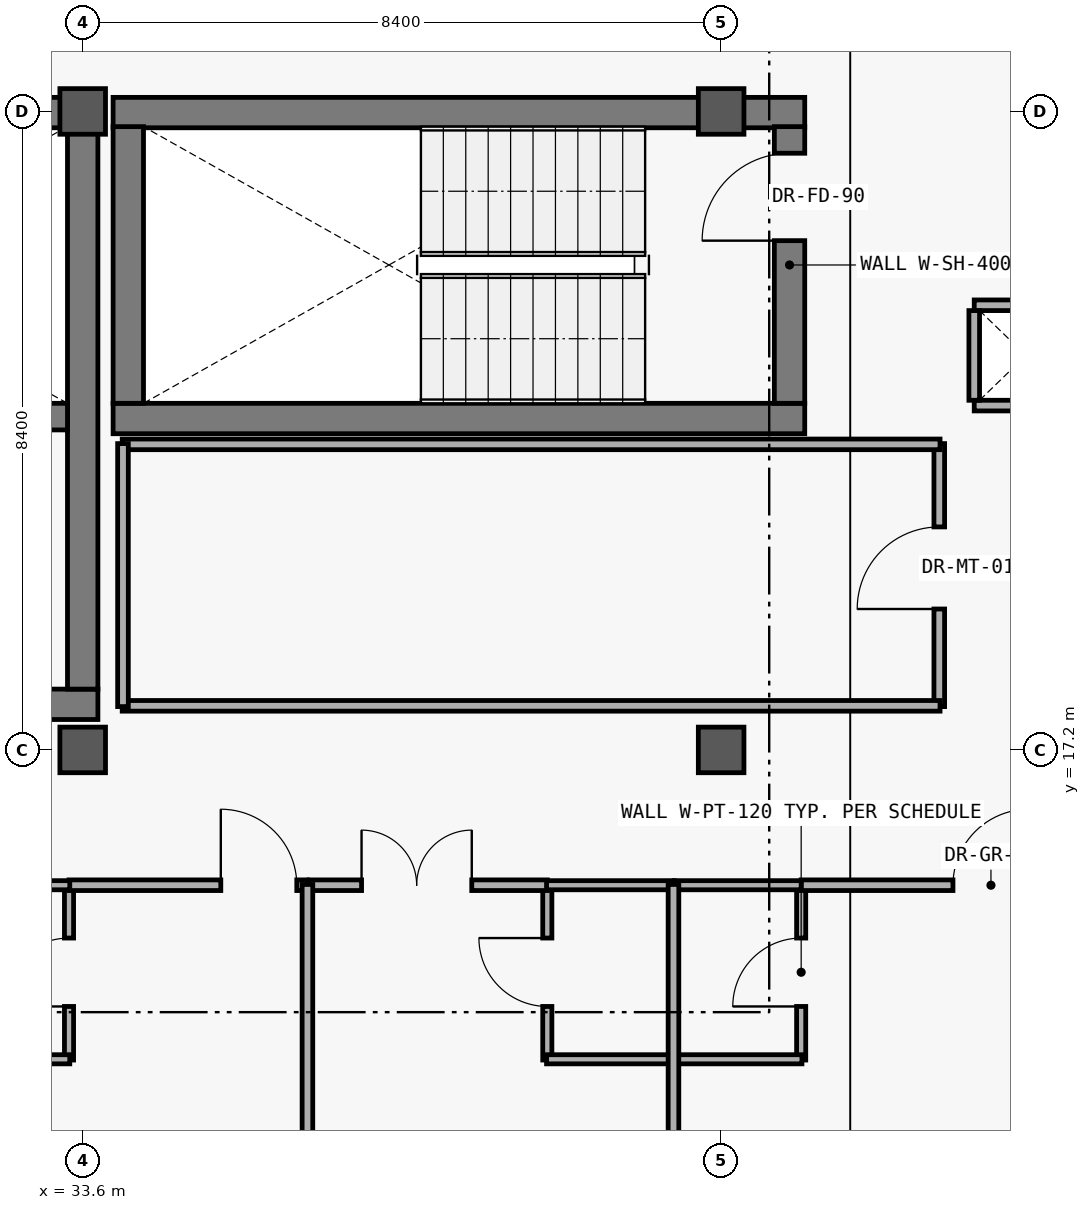
"""IFC4 building model, lengths in metres.
Left out: names, types, materials, properties, quantities, classifications, styles, units other than length and angle.
Written with IfcOpenShell. Run it as: python <this file> out.ifc"""

import sys

from ifc_helpers import new_model, si_unit, direction, frame, frame_2d, origin, origin_2d, place, context, subcontext, project, spatial, rectangle, extrude, element, fill, save


model = new_model("IFC4")
c1 = context("Model", 3, precision=1e-05, world=origin(), true_north=direction((0.0, 1.0)))
c2 = subcontext(c1, "Body", "Model", "MODEL_VIEW")
j1 = project(units=[si_unit("LENGTHUNIT", "METRE"), si_unit("PLANEANGLEUNIT", "RADIAN")], contexts=[c1])
p1 = place(None, origin())
s1 = spatial("IfcSite", under=j1, at=p1, CompositionType="ELEMENT")
p2 = place(p1, origin())
s2 = spatial("IfcBuilding", under=s1, at=p2, CompositionType="ELEMENT")
p3 = place(p2, frame((0.0, 0.0, 37.2)))
s3 = spatial("IfcBuildingStorey", under=s2, at=p3, CompositionType="ELEMENT", Elevation=37.2)
for number, where, z_axis, x_axis in (
    (1, (33.6, 17.2, 0.0), (0.0, 0.0, 1.0), (1.0, 0.0, 0.0)),
    (2, (33.6, 25.6, 0.0), (0.0, 0.0, 1.0), (1.0, 0.0, 0.0)),
    (3, (42.0, 17.2, 0.0), (0.0, 0.0, 1.0), (1.0, 0.0, 0.0)),
    (4, (42.0, 25.6, 0.0), (0.0, 0.0, 1.0), (1.0, 0.0, 0.0)),
):
    element("IfcColumn", number, at=place(p3, frame(where, z_axis=z_axis, x_axis=x_axis)), inside=s3, PredefinedType="COLUMN", context=c2, shape_type="SweptSolid", body=[
        extrude(rectangle(XDim=0.6, YDim=0.6, at=origin_2d()), origin(), (0.0, 0.0, 1.0), 3.6),
    ])
p4 = place(p3, frame((24.6, 17.8, 0.0), z_axis=(0.0, 0.0, 1.0), x_axis=(1.0, 0.0, 0.0)))
e5 = element("IfcWall", 5, at=p4, inside=s3, PredefinedType="SHEAR", context=c2, shape_type="SweptSolid", body=[
    extrude(rectangle(XDim=9.2, YDim=0.4, at=frame_2d((4.6, 0.0))), origin(), (0.0, 0.0, 1.0), 3.32),
])
p5 = place(p4, frame((1.1, 0.0, 0.0)))
e6 = element("IfcOpeningElement", 6, at=p5, cuts=e5, PredefinedType="OPENING", context=c2, shape_type="SweptSolid", body=[
    extrude(rectangle(XDim=1.2, YDim=2.2, at=frame_2d((0.6, 1.1))), frame((0.0, 0.21, 0.0), z_axis=(0.0, -1.0, 0.0), x_axis=(1.0, 0.0, 0.0)), (0.0, 0.0, 1.0), 0.42),
])
p6 = place(p4, frame((3.5, 0.0, 0.0)))
e7 = element("IfcOpeningElement", 7, at=p6, cuts=e5, PredefinedType="OPENING", context=c2, shape_type="SweptSolid", body=[
    extrude(rectangle(XDim=1.1, YDim=2.2, at=frame_2d((0.55, 1.1))), frame((0.0, 0.21, 0.0), z_axis=(0.0, -1.0, 0.0), x_axis=(1.0, 0.0, 0.0)), (0.0, 0.0, 1.0), 0.42),
])
p7 = place(p4, frame((5.9, 0.0, 0.0)))
e8 = element("IfcOpeningElement", 8, at=p7, cuts=e5, PredefinedType="OPENING", context=c2, shape_type="SweptSolid", body=[
    extrude(rectangle(XDim=1.1, YDim=2.2, at=frame_2d((0.55, 1.1))), frame((0.0, 0.21, 0.0), z_axis=(0.0, -1.0, 0.0), x_axis=(1.0, 0.0, 0.0)), (0.0, 0.0, 1.0), 0.42),
])
p8 = place(p3, frame((33.8, 25.585, 0.0), z_axis=(0.0, 0.0, 1.0), x_axis=(-1.0, 0.0, 0.0)))
e9 = element("IfcWall", 9, at=p8, inside=s3, PredefinedType="SHEAR", context=c2, shape_type="SweptSolid", body=[
    extrude(rectangle(XDim=9.2, YDim=0.4, at=frame_2d((4.6, 0.0))), origin(), (0.0, 0.0, 1.0), 3.32),
])
p9 = place(p3, frame((33.6, 18.0, 0.0), z_axis=(0.0, 0.0, 1.0), x_axis=(0.0, 1.0, 0.0)))
e10 = element("IfcWall", 10, at=p9, inside=s3, PredefinedType="SHEAR", context=c2, shape_type="SweptSolid", body=[
    extrude(rectangle(XDim=7.4, YDim=0.4, at=frame_2d((3.7, 0.0))), origin(), (0.0, 0.0, 1.0), 3.32),
])
p10 = place(p3, frame((25.0, 21.585, 0.0), z_axis=(0.0, 0.0, 1.0), x_axis=(1.0, 0.0, 0.0)))
e11 = element("IfcWall", 11, at=p10, inside=s3, PredefinedType="SHEAR", context=c2, shape_type="SweptSolid", body=[
    extrude(rectangle(XDim=8.4, YDim=0.35, at=frame_2d((4.2, 0.0))), origin(), (0.0, 0.0, 1.0), 3.32),
])
for number, where, z_axis, x_axis in (
    (12, (34.0, 21.56, 0.0), (0.0, 0.0, 1.0), (1.0, 0.0, 0.0)),
    (13, (43.1, 25.585, 0.0), (0.0, 0.0, 1.0), (-1.0, 0.0, 0.0)),
):
    element("IfcWall", number, at=place(p3, frame(where, z_axis=z_axis, x_axis=x_axis)), inside=s3, PredefinedType="SHEAR", context=c2, shape_type="SweptSolid", body=[
        extrude(rectangle(XDim=9.1, YDim=0.4, at=frame_2d((4.55, 0.0))), origin(), (0.0, 0.0, 1.0), 3.32),
    ])
p11 = place(p3, frame((34.2, 25.4, 0.0), z_axis=(0.0, 0.0, 1.0), x_axis=(0.0, -1.0, 0.0)))
e14 = element("IfcWall", 14, at=p11, inside=s3, PredefinedType="SHEAR", context=c2, shape_type="SweptSolid", body=[
    extrude(rectangle(XDim=3.64, YDim=0.4, at=frame_2d((1.82, 0.0))), origin(), (0.0, 0.0, 1.0), 3.32),
])
p12 = place(p3, frame((42.9, 21.76, 0.0), z_axis=(0.0, 0.0, 1.0), x_axis=(0.0, 1.0, 0.0)))
e15 = element("IfcWall", 15, at=p12, inside=s3, PredefinedType="SHEAR", context=c2, shape_type="SweptSolid", body=[
    extrude(rectangle(XDim=3.64, YDim=0.4, at=frame_2d((1.82, 0.0))), origin(), (0.0, 0.0, 1.0), 3.32),
])
p13 = place(p12, frame((2.14, 0.0, 0.0)))
e16 = element("IfcOpeningElement", 16, at=p13, cuts=e15, PredefinedType="OPENING", context=c2, shape_type="SweptSolid", body=[
    extrude(rectangle(XDim=1.15, YDim=2.2, at=frame_2d((0.575, 1.1))), frame((0.0, 0.21, 0.0), z_axis=(0.0, -1.0, 0.0), x_axis=(1.0, 0.0, 0.0)), (0.0, 0.0, 1.0), 0.42),
])
p14 = place(p3, frame((33.42, 13.12, 0.0), z_axis=(0.0, 0.0, 1.0), x_axis=(0.0, 1.0, 0.0)))
e17 = element("IfcWall", 17, at=p14, inside=s3, PredefinedType="PARTITIONING", context=c2, shape_type="SweptSolid", body=[
    extrude(rectangle(XDim=2.31, YDim=0.12, at=frame_2d((1.155, 0.0))), origin(), (0.0, 0.0, 1.0), 2.48),
])
p15 = place(p14, frame((0.705, 0.0, 0.0)))
e18 = element("IfcOpeningElement", 18, at=p15, cuts=e17, PredefinedType="OPENING", context=c2, shape_type="SweptSolid", body=[
    extrude(rectangle(XDim=0.9, YDim=2.18, at=frame_2d((0.45, 1.09))), frame((0.0, 0.07, 0.0), z_axis=(0.0, -1.0, 0.0), x_axis=(1.0, 0.0, 0.0)), (0.0, 0.0, 1.0), 0.14),
])
p16 = place(p3, frame((39.713, 13.12, 0.0), z_axis=(0.0, 0.0, 1.0), x_axis=(0.0, 1.0, 0.0)))
e19 = element("IfcWall", 19, at=p16, inside=s3, PredefinedType="PARTITIONING", context=c2, shape_type="SweptSolid", body=[
    extrude(rectangle(XDim=2.31, YDim=0.12, at=frame_2d((1.155, 0.0))), origin(), (0.0, 0.0, 1.0), 2.48),
])
p17 = place(p16, frame((0.705, 0.0, 0.0)))
e20 = element("IfcOpeningElement", 20, at=p17, cuts=e19, PredefinedType="OPENING", context=c2, shape_type="SweptSolid", body=[
    extrude(rectangle(XDim=0.9, YDim=2.18, at=frame_2d((0.45, 1.09))), frame((0.0, 0.07, 0.0), z_axis=(0.0, -1.0, 0.0), x_axis=(1.0, 0.0, 0.0)), (0.0, 0.0, 1.0), 0.14),
])
p18 = place(p3, frame((43.053, 13.12, 0.0), z_axis=(0.0, 0.0, 1.0), x_axis=(0.0, 1.0, 0.0)))
e21 = element("IfcWall", 21, at=p18, inside=s3, PredefinedType="PARTITIONING", context=c2, shape_type="SweptSolid", body=[
    extrude(rectangle(XDim=2.31, YDim=0.12, at=frame_2d((1.155, 0.0))), origin(), (0.0, 0.0, 1.0), 2.48),
])
p19 = place(p18, frame((0.705, 0.0, 0.0)))
e22 = element("IfcOpeningElement", 22, at=p19, cuts=e21, PredefinedType="OPENING", context=c2, shape_type="SweptSolid", body=[
    extrude(rectangle(XDim=0.9, YDim=2.18, at=frame_2d((0.45, 1.09))), frame((0.0, 0.07, 0.0), z_axis=(0.0, -1.0, 0.0), x_axis=(1.0, 0.0, 0.0)), (0.0, 0.0, 1.0), 0.14),
])
p20 = place(p3, frame((44.87, 17.77, 0.0), z_axis=(0.0, 0.0, 1.0), x_axis=(0.0, 1.0, 0.0)))
e23 = element("IfcWall", 23, at=p20, inside=s3, PredefinedType="PARTITIONING", context=c2, shape_type="SweptSolid", body=[
    extrude(rectangle(XDim=3.46, YDim=0.14, at=frame_2d((1.73, 0.0))), origin(), (0.0, 0.0, 1.0), 2.48),
])
p21 = place(p20, frame((1.284, 0.0, 0.0)))
e24 = element("IfcOpeningElement", 24, at=p21, cuts=e23, PredefinedType="OPENING", context=c2, shape_type="SweptSolid", body=[
    extrude(rectangle(XDim=1.08, YDim=2.25, at=frame_2d((0.54, 1.125))), frame((0.0, 0.08, 0.0), z_axis=(0.0, -1.0, 0.0), x_axis=(1.0, 0.0, 0.0)), (0.0, 0.0, 1.0), 0.16),
])
p22 = place(p3, frame((33.42, 15.42, 0.0), z_axis=(0.0, 0.0, 1.0), x_axis=(1.0, 0.0, 0.0)))
e25 = element("IfcWall", 25, at=p22, inside=s3, PredefinedType="PARTITIONING", context=c2, shape_type="SweptSolid", body=[
    extrude(rectangle(XDim=3.137, YDim=0.14, at=frame_2d((1.568, 0.0))), origin(), (0.0, 0.0, 1.0), 2.48),
])
p23 = place(p22, frame((1.997, 0.0, 0.0)))
e26 = element("IfcOpeningElement", 26, at=p23, cuts=e25, PredefinedType="OPENING", context=c2, shape_type="SweptSolid", body=[
    extrude(rectangle(XDim=1.0, YDim=2.28, at=frame_2d((0.5, 1.14))), frame((0.0, 0.08, 0.0), z_axis=(0.0, -1.0, 0.0), x_axis=(1.0, 0.0, 0.0)), (0.0, 0.0, 1.0), 0.16),
])
p24 = place(p3, frame((36.577, 15.42, 0.0), z_axis=(0.0, 0.0, 1.0), x_axis=(1.0, 0.0, 0.0)))
e27 = element("IfcWall", 27, at=p24, inside=s3, PredefinedType="PARTITIONING", context=c2, shape_type="SweptSolid", body=[
    extrude(rectangle(XDim=3.136, YDim=0.14, at=frame_2d((1.568, 0.0))), origin(), (0.0, 0.0, 1.0), 2.48),
])
p25 = place(p24, frame((0.692, 0.0, 0.0)))
e28 = element("IfcOpeningElement", 28, at=p25, cuts=e27, PredefinedType="OPENING", context=c2, shape_type="SweptSolid", body=[
    extrude(rectangle(XDim=1.45, YDim=2.3, at=frame_2d((0.725, 1.15))), frame((0.0, 0.08, 0.0), z_axis=(0.0, -1.0, 0.0), x_axis=(1.0, 0.0, 0.0)), (0.0, 0.0, 1.0), 0.16),
])
p26 = place(p3, frame((43.053, 15.42, 0.0), z_axis=(0.0, 0.0, 1.0), x_axis=(1.0, 0.0, 0.0)))
e29 = element("IfcWall", 29, at=p26, inside=s3, PredefinedType="PARTITIONING", context=c2, shape_type="SweptSolid", body=[
    extrude(rectangle(XDim=3.137, YDim=0.14, at=frame_2d((1.568, 0.0))), origin(), (0.0, 0.0, 1.0), 2.48),
])
p27 = place(p26, frame((1.997, 0.0, 0.0)))
e30 = element("IfcOpeningElement", 30, at=p27, cuts=e29, PredefinedType="OPENING", context=c2, shape_type="SweptSolid", body=[
    extrude(rectangle(XDim=1.0, YDim=2.28, at=frame_2d((0.5, 1.14))), frame((0.0, 0.08, 0.0), z_axis=(0.0, -1.0, 0.0), x_axis=(1.0, 0.0, 0.0)), (0.0, 0.0, 1.0), 0.16),
])
for number, where, z_axis, x_axis in (
    (31, (31.75, 13.13, 0.0), (0.0, 0.0, 1.0), (1.0, 0.0, 0.0)),
    (32, (31.75, 15.42, 0.0), (0.0, 0.0, 1.0), (1.0, 0.0, 0.0)),
):
    element("IfcWall", number, at=place(p3, frame(where, z_axis=z_axis, x_axis=x_axis)), inside=s3, PredefinedType="PARTITIONING", context=c2, shape_type="SweptSolid", body=[
        extrude(rectangle(XDim=1.68, YDim=0.12, at=frame_2d((0.84, 0.0))), origin(), (0.0, 0.0, 1.0), 2.48),
    ])
for number, where, z_axis, x_axis in (
    (33, (39.703, 13.13, 0.0), (0.0, 0.0, 1.0), (1.0, 0.0, 0.0)),
    (34, (39.703, 15.42, 0.0), (0.0, 0.0, 1.0), (1.0, 0.0, 0.0)),
):
    element("IfcWall", number, at=place(p3, frame(where, z_axis=z_axis, x_axis=x_axis)), inside=s3, PredefinedType="PARTITIONING", context=c2, shape_type="SweptSolid", body=[
        extrude(rectangle(XDim=1.68, YDim=0.12, at=frame_2d((0.84, 0.0))), origin(), (0.0, 0.0, 1.0), 2.48),
    ])
p28 = place(p3, frame((41.383, 13.13, 0.0), z_axis=(0.0, 0.0, 1.0), x_axis=(1.0, 0.0, 0.0)))
e35 = element("IfcWall", 35, at=p28, inside=s3, PredefinedType="PARTITIONING", context=c2, shape_type="SweptSolid", body=[
    extrude(rectangle(XDim=1.68, YDim=0.12, at=frame_2d((0.84, 0.0))), origin(), (0.0, 0.0, 1.0), 2.48),
])
p29 = place(p3, frame((41.383, 15.42, 0.0), z_axis=(0.0, 0.0, 1.0), x_axis=(1.0, 0.0, 0.0)))
e36 = element("IfcWall", 36, at=p29, inside=s3, PredefinedType="PARTITIONING", context=c2, shape_type="SweptSolid", body=[
    extrude(rectangle(XDim=1.67, YDim=0.12, at=frame_2d((0.835, 0.0))), origin(), (0.0, 0.0, 1.0), 2.48),
])
for number, where, z_axis, x_axis in (
    (37, (34.12, 17.78, 0.0), (0.0, 0.0, 1.0), (1.0, 0.0, 0.0)),
    (38, (34.12, 21.22, 0.0), (0.0, 0.0, 1.0), (1.0, 0.0, 0.0)),
):
    element("IfcWall", number, at=place(p3, frame(where, z_axis=z_axis, x_axis=x_axis)), inside=s3, PredefinedType="PARTITIONING", context=c2, shape_type="SweptSolid", body=[
        extrude(rectangle(XDim=10.76, YDim=0.14, at=frame_2d((5.38, 0.0))), origin(), (0.0, 0.0, 1.0), 2.48),
    ])
p30 = place(p3, frame((34.13, 17.77, 0.0), z_axis=(0.0, 0.0, 1.0), x_axis=(0.0, 1.0, 0.0)))
e39 = element("IfcWall", 39, at=p30, inside=s3, PredefinedType="PARTITIONING", context=c2, shape_type="SweptSolid", body=[
    extrude(rectangle(XDim=3.46, YDim=0.14, at=frame_2d((1.73, 0.0))), origin(), (0.0, 0.0, 1.0), 2.48),
])
for number, where, z_axis, x_axis in (
    (40, (36.557, 9.08, 0.0), (0.0, 0.0, 1.0), (0.0, 1.0, 0.0)),
    (41, (41.373, 9.08, 0.0), (0.0, 0.0, 1.0), (0.0, 1.0, 0.0)),
):
    element("IfcWall", number, at=place(p3, frame(where, z_axis=z_axis, x_axis=x_axis)), inside=s3, PredefinedType="PARTITIONING", context=c2, shape_type="SweptSolid", body=[
        extrude(rectangle(XDim=6.35, YDim=0.14, at=frame_2d((3.175, 0.0))), origin(), (0.0, 0.0, 1.0), 2.48),
    ])
for number, where, z_axis, x_axis in (
    (42, (45.33, 21.73, 0.0), (0.0, 0.0, 1.0), (1.0, 0.0, 0.0)),
    (43, (46.69, 23.05, 0.0), (0.0, 0.0, 1.0), (-1.0, 0.0, 0.0)),
):
    element("IfcWall", number, at=place(p3, frame(where, z_axis=z_axis, x_axis=x_axis)), inside=s3, PredefinedType="PARTITIONING", context=c2, shape_type="SweptSolid", body=[
        extrude(rectangle(XDim=1.36, YDim=0.14, at=frame_2d((0.68, 0.0))), origin(), (0.0, 0.0, 1.0), 2.44),
    ])
p31 = place(p3, frame((45.33, 22.98, 0.0), z_axis=(0.0, 0.0, 1.0), x_axis=(0.0, -1.0, 0.0)))
e44 = element("IfcWall", 44, at=p31, inside=s3, PredefinedType="PARTITIONING", context=c2, shape_type="SweptSolid", body=[
    extrude(rectangle(XDim=1.18, YDim=0.14, at=frame_2d((0.59, 0.0))), origin(), (0.0, 0.0, 1.0), 2.44),
])
p32 = place(p13, origin())
e45 = element("IfcDoor", 45, at=p32, inside=s3, OperationType="SINGLE_SWING_LEFT", PredefinedType="DOOR", context=c2, shape_type="SweptSolid", body=[
    extrude(rectangle(XDim=1.15, YDim=2.2, at=frame_2d((0.575, 1.1))), frame((0.0, 0.025, 0.0), z_axis=(0.0, -1.0, 0.0), x_axis=(1.0, 0.0, 0.0)), (0.0, 0.0, 1.0), 0.05),
])
fill(e16, e45)
p33 = place(p15, origin())
e46 = element("IfcDoor", 46, at=p33, inside=s3, OperationType="SINGLE_SWING_LEFT", PredefinedType="DOOR", context=c2, shape_type="SweptSolid", body=[
    extrude(rectangle(XDim=0.9, YDim=2.18, at=frame_2d((0.45, 1.09))), frame((0.0, 0.025, 0.0), z_axis=(0.0, -1.0, 0.0), x_axis=(1.0, 0.0, 0.0)), (0.0, 0.0, 1.0), 0.05),
])
fill(e18, e46)
p34 = place(p17, origin())
e47 = element("IfcDoor", 47, at=p34, inside=s3, OperationType="SINGLE_SWING_RIGHT", PredefinedType="DOOR", context=c2, shape_type="SweptSolid", body=[
    extrude(rectangle(XDim=0.9, YDim=2.18, at=frame_2d((0.45, 1.09))), frame((0.0, 0.025, 0.0), z_axis=(0.0, -1.0, 0.0), x_axis=(1.0, 0.0, 0.0)), (0.0, 0.0, 1.0), 0.05),
])
fill(e20, e47)
p35 = place(p19, origin())
e48 = element("IfcDoor", 48, at=p35, inside=s3, OperationType="SINGLE_SWING_LEFT", PredefinedType="DOOR", context=c2, shape_type="SweptSolid", body=[
    extrude(rectangle(XDim=0.9, YDim=2.18, at=frame_2d((0.45, 1.09))), frame((0.0, 0.025, 0.0), z_axis=(0.0, -1.0, 0.0), x_axis=(1.0, 0.0, 0.0)), (0.0, 0.0, 1.0), 0.05),
])
fill(e22, e48)
p36 = place(p21, origin())
e49 = element("IfcDoor", 49, at=p36, inside=s3, OperationType="SINGLE_SWING_LEFT", PredefinedType="DOOR", context=c2, shape_type="SweptSolid", body=[
    extrude(rectangle(XDim=1.08, YDim=2.25, at=frame_2d((0.54, 1.125))), frame((0.0, 0.025, 0.0), z_axis=(0.0, -1.0, 0.0), x_axis=(1.0, 0.0, 0.0)), (0.0, 0.0, 1.0), 0.05),
])
fill(e24, e49)
p37 = place(p23, origin())
e50 = element("IfcDoor", 50, at=p37, inside=s3, OperationType="SINGLE_SWING_LEFT", PredefinedType="DOOR", context=c2, shape_type="SweptSolid", body=[
    extrude(rectangle(XDim=1.0, YDim=2.28, at=frame_2d((0.5, 1.14))), frame((0.0, 0.025, 0.0), z_axis=(0.0, -1.0, 0.0), x_axis=(1.0, 0.0, 0.0)), (0.0, 0.0, 1.0), 0.05),
])
fill(e26, e50)
p38 = place(p25, origin())
e51 = element("IfcDoor", 51, at=p38, inside=s3, OperationType="DOUBLE_DOOR_SINGLE_SWING", PredefinedType="DOOR", context=c2, shape_type="SweptSolid", body=[
    extrude(rectangle(XDim=1.45, YDim=2.3, at=frame_2d((0.725, 1.15))), frame((0.0, 0.025, 0.0), z_axis=(0.0, -1.0, 0.0), x_axis=(1.0, 0.0, 0.0)), (0.0, 0.0, 1.0), 0.05),
])
fill(e28, e51)
p39 = place(p27, origin())
e52 = element("IfcDoor", 52, at=p39, inside=s3, OperationType="SINGLE_SWING_RIGHT", PredefinedType="DOOR", context=c2, shape_type="SweptSolid", body=[
    extrude(rectangle(XDim=1.0, YDim=2.28, at=frame_2d((0.5, 1.14))), frame((0.0, 0.025, 0.0), z_axis=(0.0, -1.0, 0.0), x_axis=(1.0, 0.0, 0.0)), (0.0, 0.0, 1.0), 0.05),
])
fill(e30, e52)
save(model, sys.argv[1])
